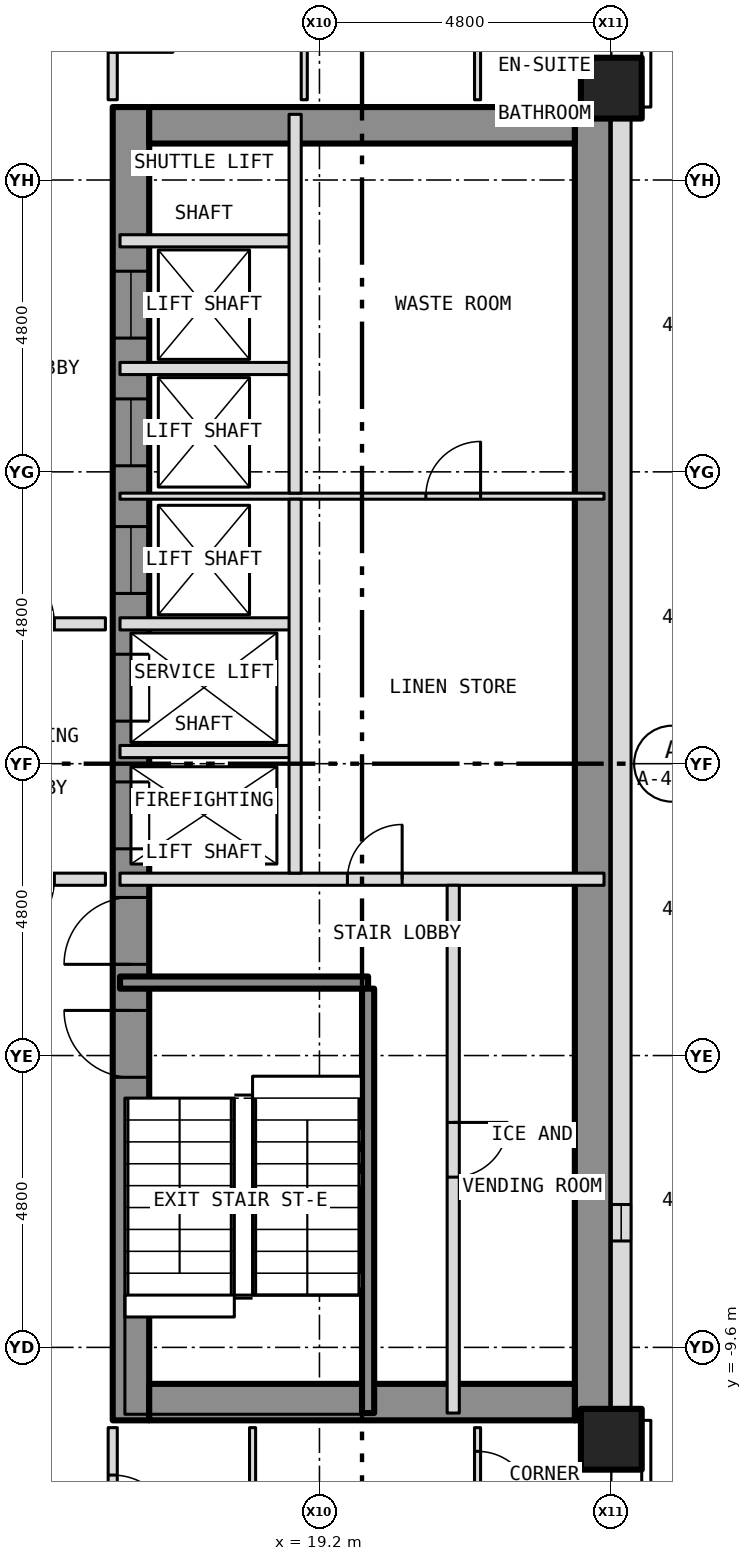
"""IFC4 building model, lengths in metres.
Left out: names, types, materials, properties, quantities, classifications, styles, units other than length and angle.
Written with IfcOpenShell. Run it as: python <this file> out.ifc"""

import sys

from ifc_helpers import new_model, si_unit, direction, frame, frame_2d, origin, origin_2d, place, context, subcontext, project, spatial, rectangle, hollow_rectangle, extrude, element, fill, save


model = new_model("IFC4")
c1 = context("Model", 3, precision=1e-05, world=origin(), true_north=direction((0.0, 1.0)))
c2 = subcontext(c1, "Body", "Model", "MODEL_VIEW")
j1 = project(units=[si_unit("LENGTHUNIT", "METRE"), si_unit("PLANEANGLEUNIT", "RADIAN")], contexts=[c1])
p1 = place(None, origin())
s1 = spatial("IfcSite", under=j1, at=p1, CompositionType="ELEMENT")
p2 = place(p1, origin())
s2 = spatial("IfcBuilding", under=s1, at=p2, CompositionType="ELEMENT")
p3 = place(p2, frame((0.0, 0.0, 56.5)))
s3 = spatial("IfcBuildingStorey", under=s2, at=p3, CompositionType="ELEMENT", Elevation=56.5)
for number, where, z_axis, x_axis in (
    (1, (24.0, -11.111, -0.15), (0.0, 0.0, 1.0), (1.0, 0.0, 0.0)),
    (2, (24.0, 11.111, -0.15), (0.0, 0.0, 1.0), (1.0, 0.0, 0.0)),
):
    element("IfcColumn", number, at=place(p3, frame(where, z_axis=z_axis, x_axis=x_axis)), inside=s3, PredefinedType="COLUMN", context=c2, shape_type="SweptSolid", body=[
        extrude(hollow_rectangle(XDim=1.0, YDim=1.0, WallThickness=0.06, at=origin_2d()), origin(), (0.0, 0.0, 1.0), 3.5),
    ])
p4 = place(p3, frame((16.1, -10.8, 0.0), z_axis=(0.0, 0.0, 1.0), x_axis=(0.0, 1.0, 0.0)))
e3 = element("IfcWall", 3, at=p4, inside=s3, PredefinedType="SHEAR", context=c2, shape_type="SweptSolid", body=[
    extrude(rectangle(XDim=21.6, YDim=0.6, at=frame_2d((10.8, 0.0))), origin(), (0.0, 0.0, 1.0), 3.25),
])
p5 = place(p4, frame((9.4, 0.0, 0.0)))
e4 = element("IfcOpeningElement", 4, at=p5, cuts=e3, PredefinedType="OPENING", context=c2, shape_type="SweptSolid", body=[
    extrude(rectangle(XDim=1.1, YDim=2.1, at=frame_2d((0.55, 1.05))), frame((0.0, 0.312, 0.0), z_axis=(0.0, -1.0, 0.0), x_axis=(1.0, 0.0, 0.0)), (0.0, 0.0, 1.0), 0.624),
])
p6 = place(p4, frame((11.5, 0.0, 0.0)))
e5 = element("IfcOpeningElement", 5, at=p6, cuts=e3, PredefinedType="OPENING", context=c2, shape_type="SweptSolid", body=[
    extrude(rectangle(XDim=1.1, YDim=2.1, at=frame_2d((0.55, 1.05))), frame((0.0, 0.312, 0.0), z_axis=(0.0, -1.0, 0.0), x_axis=(1.0, 0.0, 0.0)), (0.0, 0.0, 1.0), 0.624),
])
p7 = place(p4, frame((13.6, 0.0, 0.0)))
e6 = element("IfcOpeningElement", 6, at=p7, cuts=e3, PredefinedType="OPENING", context=c2, shape_type="SweptSolid", body=[
    extrude(rectangle(XDim=1.1, YDim=2.1, at=frame_2d((0.55, 1.05))), frame((0.0, 0.312, 0.0), z_axis=(0.0, -1.0, 0.0), x_axis=(1.0, 0.0, 0.0)), (0.0, 0.0, 1.0), 0.624),
])
p8 = place(p4, frame((15.7, 0.0, 0.0)))
e7 = element("IfcOpeningElement", 7, at=p8, cuts=e3, PredefinedType="OPENING", context=c2, shape_type="SweptSolid", body=[
    extrude(rectangle(XDim=1.1, YDim=2.1, at=frame_2d((0.55, 1.05))), frame((0.0, 0.312, 0.0), z_axis=(0.0, -1.0, 0.0), x_axis=(1.0, 0.0, 0.0)), (0.0, 0.0, 1.0), 0.624),
])
p9 = place(p4, frame((17.8, 0.0, 0.0)))
e8 = element("IfcOpeningElement", 8, at=p9, cuts=e3, PredefinedType="OPENING", context=c2, shape_type="SweptSolid", body=[
    extrude(rectangle(XDim=1.1, YDim=2.1, at=frame_2d((0.55, 1.05))), frame((0.0, 0.312, 0.0), z_axis=(0.0, -1.0, 0.0), x_axis=(1.0, 0.0, 0.0)), (0.0, 0.0, 1.0), 0.624),
])
p10 = place(p4, frame((5.642, 0.0, 0.0)))
e9 = element("IfcOpeningElement", 9, at=p10, cuts=e3, PredefinedType="OPENING", context=c2, shape_type="SweptSolid", body=[
    extrude(rectangle(XDim=1.1, YDim=2.1, at=frame_2d((0.55, 1.05))), frame((0.0, 0.312, 0.0), z_axis=(0.0, -1.0, 0.0), x_axis=(1.0, 0.0, 0.0)), (0.0, 0.0, 1.0), 0.624),
])
p11 = place(p4, frame((7.5, 0.0, 0.0)))
e10 = element("IfcOpeningElement", 10, at=p11, cuts=e3, PredefinedType="OPENING", context=c2, shape_type="SweptSolid", body=[
    extrude(rectangle(XDim=1.1, YDim=2.1, at=frame_2d((0.55, 1.05))), frame((0.0, 0.312, 0.0), z_axis=(0.0, -1.0, 0.0), x_axis=(1.0, 0.0, 0.0)), (0.0, 0.0, 1.0), 0.624),
])
p12 = place(p3, frame((23.7, -10.8, 0.0), z_axis=(0.0, 0.0, 1.0), x_axis=(0.0, 1.0, 0.0)))
e11 = element("IfcWall", 11, at=p12, inside=s3, PredefinedType="SHEAR", context=c2, shape_type="SweptSolid", body=[
    extrude(rectangle(XDim=21.6, YDim=0.6, at=frame_2d((10.8, 0.0))), origin(), (0.0, 0.0, 1.0), 3.25),
])
for number, where, z_axis, x_axis in (
    (12, (16.4, 10.5, 0.0), (0.0, 0.0, 1.0), (1.0, 0.0, 0.0)),
    (13, (16.4, -10.5, 0.0), (0.0, 0.0, 1.0), (1.0, 0.0, 0.0)),
):
    element("IfcWall", number, at=place(p3, frame(where, z_axis=z_axis, x_axis=x_axis)), inside=s3, PredefinedType="SHEAR", context=c2, shape_type="SweptSolid", body=[
        extrude(rectangle(XDim=7.0, YDim=0.6, at=frame_2d((3.5, 0.0))), origin(), (0.0, 0.0, 1.0), 3.25),
    ])
p13 = place(p3, frame((24.163, -10.8, 0.0), z_axis=(0.0, 0.0, 1.0), x_axis=(0.0, 1.0, 0.0)))
e14 = element("IfcWall", 14, at=p13, inside=s3, PredefinedType="SOLIDWALL", context=c2, shape_type="SweptSolid", body=[
    extrude(rectangle(XDim=21.6, YDim=0.325, at=frame_2d((10.8, 0.0))), origin(), (0.0, 0.0, 1.0), 3.5),
])
p14 = place(p13, frame((2.95, 0.0, 1.0)))
e15 = element("IfcOpeningElement", 15, at=p14, cuts=e14, PredefinedType="OPENING", context=c2, shape_type="SweptSolid", body=[
    extrude(rectangle(XDim=0.6, YDim=1.5, at=frame_2d((0.3, 0.75))), frame((0.0, 0.175, 0.0), z_axis=(0.0, -1.0, 0.0), x_axis=(1.0, 0.0, 0.0)), (0.0, 0.0, 1.0), 0.349),
])
p15 = place(p3, frame((15.92, -3.6, 0.0), z_axis=(0.0, 0.0, 1.0), x_axis=(1.0, 0.0, 0.0)))
e16 = element("IfcWall", 16, at=p15, inside=s3, PredefinedType="SHEAR", context=c2, shape_type="SweptSolid", body=[
    extrude(rectangle(XDim=4.08, YDim=0.2, at=frame_2d((2.04, 0.0))), origin(), (0.0, 0.0, 1.0), 3.25),
])
p16 = place(p3, frame((12.4, -1.9, 0.0), z_axis=(0.0, 0.0, 1.0), x_axis=(1.0, 0.0, 0.0)))
e17 = element("IfcWall", 17, at=p16, inside=s3, PredefinedType="PARTITIONING", context=c2, shape_type="SweptSolid", body=[
    extrude(rectangle(XDim=3.28, YDim=0.2, at=frame_2d((1.64, 0.0))), origin(), (0.0, 0.0, 1.0), 3.35),
])
p17 = place(p16, frame((1.34, 0.0, 0.0)))
e18 = element("IfcOpeningElement", 18, at=p17, cuts=e17, PredefinedType="OPENING", context=c2, shape_type="SweptSolid", body=[
    extrude(rectangle(XDim=1.1, YDim=2.1, at=frame_2d((0.55, 1.05))), frame((0.0, 0.112, 0.0), z_axis=(0.0, -1.0, 0.0), x_axis=(1.0, 0.0, 0.0)), (0.0, 0.0, 1.0), 0.224),
])
p18 = place(p3, frame((15.92, -1.9, 0.0), z_axis=(0.0, 0.0, 1.0), x_axis=(1.0, 0.0, 0.0)))
e19 = element("IfcWall", 19, at=p18, inside=s3, PredefinedType="PARTITIONING", context=c2, shape_type="SweptSolid", body=[
    extrude(rectangle(XDim=7.96, YDim=0.2, at=frame_2d((3.98, 0.0))), origin(), (0.0, 0.0, 1.0), 3.25),
])
p19 = place(p18, frame((3.74, 0.0, 0.0)))
e20 = element("IfcOpeningElement", 20, at=p19, cuts=e19, PredefinedType="OPENING", context=c2, shape_type="SweptSolid", body=[
    extrude(rectangle(XDim=0.9, YDim=2.1, at=frame_2d((0.45, 1.05))), frame((0.0, 0.112, 0.0), z_axis=(0.0, -1.0, 0.0), x_axis=(1.0, 0.0, 0.0)), (0.0, 0.0, 1.0), 0.224),
])
p20 = place(p3, frame((15.92, 0.2, 0.0), z_axis=(0.0, 0.0, 1.0), x_axis=(1.0, 0.0, 0.0)))
e21 = element("IfcWall", 21, at=p20, inside=s3, PredefinedType="PARTITIONING", context=c2, shape_type="SweptSolid", body=[
    extrude(rectangle(XDim=2.88, YDim=0.2, at=frame_2d((1.44, 0.0))), origin(), (0.0, 0.0, 1.0), 3.25),
])
p21 = place(p3, frame((12.4, 2.3, 0.0), z_axis=(0.0, 0.0, 1.0), x_axis=(1.0, 0.0, 0.0)))
e22 = element("IfcWall", 22, at=p21, inside=s3, PredefinedType="PARTITIONING", context=c2, shape_type="SweptSolid", body=[
    extrude(rectangle(XDim=3.28, YDim=0.2, at=frame_2d((1.64, 0.0))), origin(), (0.0, 0.0, 1.0), 3.35),
])
p22 = place(p21, frame((1.34, 0.0, 0.0)))
e23 = element("IfcOpeningElement", 23, at=p22, cuts=e22, PredefinedType="OPENING", context=c2, shape_type="SweptSolid", body=[
    extrude(rectangle(XDim=1.1, YDim=2.1, at=frame_2d((0.55, 1.05))), frame((0.0, 0.112, 0.0), z_axis=(0.0, -1.0, 0.0), x_axis=(1.0, 0.0, 0.0)), (0.0, 0.0, 1.0), 0.224),
])
p23 = place(p3, frame((15.92, 2.3, 0.0), z_axis=(0.0, 0.0, 1.0), x_axis=(1.0, 0.0, 0.0)))
e24 = element("IfcWall", 24, at=p23, inside=s3, PredefinedType="PARTITIONING", context=c2, shape_type="SweptSolid", body=[
    extrude(rectangle(XDim=2.88, YDim=0.2, at=frame_2d((1.44, 0.0))), origin(), (0.0, 0.0, 1.0), 3.25),
])
p24 = place(p3, frame((15.92, 4.4, 0.0), z_axis=(0.0, 0.0, 1.0), x_axis=(1.0, 0.0, 0.0)))
e25 = element("IfcWall", 25, at=p24, inside=s3, PredefinedType="PARTITIONING", context=c2, shape_type="SweptSolid", body=[
    extrude(rectangle(XDim=7.96, YDim=0.1, at=frame_2d((3.98, 0.0))), origin(), (0.0, 0.0, 1.0), 3.25),
])
p25 = place(p24, frame((5.03, 0.0, 0.0)))
e26 = element("IfcOpeningElement", 26, at=p25, cuts=e25, PredefinedType="OPENING", context=c2, shape_type="SweptSolid", body=[
    extrude(rectangle(XDim=0.9, YDim=2.1, at=frame_2d((0.45, 1.05))), frame((0.0, 0.062, 0.0), z_axis=(0.0, -1.0, 0.0), x_axis=(1.0, 0.0, 0.0)), (0.0, 0.0, 1.0), 0.124),
])
for number, where, z_axis, x_axis in (
    (27, (15.92, 6.5, 0.0), (0.0, 0.0, 1.0), (1.0, 0.0, 0.0)),
    (28, (15.92, 8.6, 0.0), (0.0, 0.0, 1.0), (1.0, 0.0, 0.0)),
):
    element("IfcWall", number, at=place(p3, frame(where, z_axis=z_axis, x_axis=x_axis)), inside=s3, PredefinedType="PARTITIONING", context=c2, shape_type="SweptSolid", body=[
        extrude(rectangle(XDim=2.88, YDim=0.2, at=frame_2d((1.44, 0.0))), origin(), (0.0, 0.0, 1.0), 3.25),
    ])
p26 = place(p3, frame((15.8, -15.725, 0.0), z_axis=(0.0, 0.0, 1.0), x_axis=(0.0, 1.0, 0.0)))
e29 = element("IfcWall", 29, at=p26, inside=s3, PredefinedType="PARTITIONING", context=c2, shape_type="SweptSolid", body=[
    extrude(rectangle(XDim=4.805, YDim=0.15, at=frame_2d((2.403, 0.0))), origin(), (0.0, 0.0, 1.0), 3.35),
])
p27 = place(p26, frame((3.025, 0.0, 0.0)))
e30 = element("IfcOpeningElement", 30, at=p27, cuts=e29, PredefinedType="OPENING", context=c2, shape_type="SweptSolid", body=[
    extrude(rectangle(XDim=1.0, YDim=2.1, at=frame_2d((0.5, 1.05))), frame((0.0, 0.087, 0.0), z_axis=(0.0, -1.0, 0.0), x_axis=(1.0, 0.0, 0.0)), (0.0, 0.0, 1.0), 0.174),
])
p28 = place(p3, frame((15.8, 10.92, 0.0), z_axis=(0.0, 0.0, 1.0), x_axis=(0.0, 1.0, 0.0)))
e31 = element("IfcWall", 31, at=p28, inside=s3, PredefinedType="PARTITIONING", context=c2, shape_type="SweptSolid", body=[
    extrude(rectangle(XDim=4.805, YDim=0.15, at=frame_2d((2.403, 0.0))), origin(), (0.0, 0.0, 1.0), 3.35),
])
p29 = place(p28, frame((0.78, 0.0, 0.0)))
e32 = element("IfcOpeningElement", 32, at=p29, cuts=e31, PredefinedType="OPENING", context=c2, shape_type="SweptSolid", body=[
    extrude(rectangle(XDim=1.0, YDim=2.1, at=frame_2d((0.5, 1.05))), frame((0.0, 0.087, 0.0), z_axis=(0.0, -1.0, 0.0), x_axis=(1.0, 0.0, 0.0)), (0.0, 0.0, 1.0), 0.174),
])
p30 = place(p3, frame((18.1, -24.53, 0.0), z_axis=(0.0, 0.0, 1.0), x_axis=(0.0, 1.0, 0.0)))
e33 = element("IfcWall", 33, at=p30, inside=s3, PredefinedType="PARTITIONING", context=c2, shape_type="SweptSolid", body=[
    extrude(rectangle(XDim=13.61, YDim=0.1, at=frame_2d((6.805, 0.0))), origin(), (0.0, 0.0, 1.0), 3.35),
])
p31 = place(p30, frame((6.68, 0.0, 0.0)))
e34 = element("IfcOpeningElement", 34, at=p31, cuts=e33, PredefinedType="OPENING", context=c2, shape_type="SweptSolid", body=[
    extrude(rectangle(XDim=0.9, YDim=2.1, at=frame_2d((0.45, 1.05))), frame((0.0, 0.062, 0.0), z_axis=(0.0, -1.0, 0.0), x_axis=(1.0, 0.0, 0.0)), (0.0, 0.0, 1.0), 0.124),
])
p32 = place(p3, frame((18.8, -1.8, 0.0), z_axis=(0.0, 0.0, 1.0), x_axis=(0.0, 1.0, 0.0)))
e35 = element("IfcWall", 35, at=p32, inside=s3, PredefinedType="PARTITIONING", context=c2, shape_type="SweptSolid", body=[
    extrude(rectangle(XDim=6.15, YDim=0.2, at=frame_2d((3.075, 0.0))), origin(), (0.0, 0.0, 1.0), 3.25),
])
p33 = place(p3, frame((18.8, 4.45, 0.0), z_axis=(0.0, 0.0, 1.0), x_axis=(0.0, 1.0, 0.0)))
e36 = element("IfcWall", 36, at=p33, inside=s3, PredefinedType="PARTITIONING", context=c2, shape_type="SweptSolid", body=[
    extrude(rectangle(XDim=6.23, YDim=0.2, at=frame_2d((3.115, 0.0))), origin(), (0.0, 0.0, 1.0), 3.25),
])
p34 = place(p3, frame((18.95, 10.92, 0.0), z_axis=(0.0, 0.0, 1.0), x_axis=(0.0, 1.0, 0.0)))
e37 = element("IfcWall", 37, at=p34, inside=s3, PredefinedType="PARTITIONING", context=c2, shape_type="SweptSolid", body=[
    extrude(rectangle(XDim=13.61, YDim=0.1, at=frame_2d((6.805, 0.0))), origin(), (0.0, 0.0, 1.0), 3.35),
])
p35 = place(p34, frame((6.03, 0.0, 0.0)))
e38 = element("IfcOpeningElement", 38, at=p35, cuts=e37, PredefinedType="OPENING", context=c2, shape_type="SweptSolid", body=[
    extrude(rectangle(XDim=0.9, YDim=2.1, at=frame_2d((0.45, 1.05))), frame((0.0, 0.062, 0.0), z_axis=(0.0, -1.0, 0.0), x_axis=(1.0, 0.0, 0.0)), (0.0, 0.0, 1.0), 0.124),
])
p36 = place(p3, frame((20.0, -10.68, 0.0), z_axis=(0.0, 0.0, 1.0), x_axis=(0.0, 1.0, 0.0)))
e39 = element("IfcWall", 39, at=p36, inside=s3, PredefinedType="SHEAR", context=c2, shape_type="SweptSolid", body=[
    extrude(rectangle(XDim=6.98, YDim=0.2, at=frame_2d((3.49, 0.0))), origin(), (0.0, 0.0, 1.0), 3.25),
])
p37 = place(p3, frame((21.4, -10.68, 0.0), z_axis=(0.0, 0.0, 1.0), x_axis=(0.0, 1.0, 0.0)))
e40 = element("IfcWall", 40, at=p37, inside=s3, PredefinedType="PARTITIONING", context=c2, shape_type="SweptSolid", body=[
    extrude(rectangle(XDim=8.68, YDim=0.2, at=frame_2d((4.34, 0.0))), origin(), (0.0, 0.0, 1.0), 3.25),
])
p38 = place(p37, frame((3.88, 0.0, 0.0)))
e41 = element("IfcOpeningElement", 41, at=p38, cuts=e40, PredefinedType="OPENING", context=c2, shape_type="SweptSolid", body=[
    extrude(rectangle(XDim=0.9, YDim=2.1, at=frame_2d((0.45, 1.05))), frame((0.0, 0.112, 0.0), z_axis=(0.0, -1.0, 0.0), x_axis=(1.0, 0.0, 0.0)), (0.0, 0.0, 1.0), 0.224),
])
p39 = place(p3, frame((21.8, -13.95, 0.0), z_axis=(0.0, 0.0, 1.0), x_axis=(0.0, 1.0, 0.0)))
e42 = element("IfcWall", 42, at=p39, inside=s3, PredefinedType="PARTITIONING", context=c2, shape_type="SweptSolid", body=[
    extrude(rectangle(XDim=3.03, YDim=0.1, at=frame_2d((1.515, 0.0))), origin(), (0.0, 0.0, 1.0), 3.35),
])
p40 = place(p39, frame((1.74, 0.0, 0.0)))
e43 = element("IfcOpeningElement", 43, at=p40, cuts=e42, PredefinedType="OPENING", context=c2, shape_type="SweptSolid", body=[
    extrude(rectangle(XDim=0.9, YDim=2.1, at=frame_2d((0.45, 1.05))), frame((0.0, 0.062, 0.0), z_axis=(0.0, -1.0, 0.0), x_axis=(1.0, 0.0, 0.0)), (0.0, 0.0, 1.0), 0.124),
])
p41 = place(p3, frame((21.8, 10.92, 0.0), z_axis=(0.0, 0.0, 1.0), x_axis=(0.0, 1.0, 0.0)))
e44 = element("IfcWall", 44, at=p41, inside=s3, PredefinedType="PARTITIONING", context=c2, shape_type="SweptSolid", body=[
    extrude(rectangle(XDim=3.03, YDim=0.1, at=frame_2d((1.515, 0.0))), origin(), (0.0, 0.0, 1.0), 3.35),
])
p42 = place(p41, frame((1.67, 0.0, 0.0)))
e45 = element("IfcOpeningElement", 45, at=p42, cuts=e44, PredefinedType="OPENING", context=c2, shape_type="SweptSolid", body=[
    extrude(rectangle(XDim=0.9, YDim=2.1, at=frame_2d((0.45, 1.05))), frame((0.0, 0.062, 0.0), z_axis=(0.0, -1.0, 0.0), x_axis=(1.0, 0.0, 0.0)), (0.0, 0.0, 1.0), 0.124),
])
p43 = place(p14, origin())
e46 = element("IfcWindow", 46, at=p43, inside=s3, PartitioningType="SINGLE_PANEL", PredefinedType="WINDOW", context=c2, shape_type="SweptSolid", body=[
    extrude(rectangle(XDim=0.6, YDim=1.5, at=frame_2d((0.3, 0.75))), frame((0.0, -0.073, 0.0), z_axis=(0.0, -1.0, 0.0), x_axis=(1.0, 0.0, 0.0)), (0.0, 0.0, 1.0), 0.06),
])
fill(e15, e46)
p44 = place(p5, origin())
e47 = element("IfcDoor", 47, at=p44, inside=s3, OperationType="SLIDING_TO_LEFT", PredefinedType="DOOR", context=c2, shape_type="SweptSolid", body=[
    extrude(rectangle(XDim=1.1, YDim=2.1, at=frame_2d((0.55, 1.05))), frame((0.0, 0.025, 0.0), z_axis=(0.0, -1.0, 0.0), x_axis=(1.0, 0.0, 0.0)), (0.0, 0.0, 1.0), 0.05),
])
fill(e4, e47)
p45 = place(p6, origin())
e48 = element("IfcDoor", 48, at=p45, inside=s3, OperationType="SLIDING_TO_LEFT", PredefinedType="DOOR", context=c2, shape_type="SweptSolid", body=[
    extrude(rectangle(XDim=1.1, YDim=2.1, at=frame_2d((0.55, 1.05))), frame((0.0, 0.025, 0.0), z_axis=(0.0, -1.0, 0.0), x_axis=(1.0, 0.0, 0.0)), (0.0, 0.0, 1.0), 0.05),
])
fill(e5, e48)
p46 = place(p7, origin())
e49 = element("IfcDoor", 49, at=p46, inside=s3, OperationType="SLIDING_TO_LEFT", PredefinedType="DOOR", context=c2, shape_type="SweptSolid", body=[
    extrude(rectangle(XDim=1.1, YDim=2.1, at=frame_2d((0.55, 1.05))), frame((0.0, 0.025, 0.0), z_axis=(0.0, -1.0, 0.0), x_axis=(1.0, 0.0, 0.0)), (0.0, 0.0, 1.0), 0.05),
])
fill(e6, e49)
p47 = place(p8, origin())
e50 = element("IfcDoor", 50, at=p47, inside=s3, OperationType="SLIDING_TO_LEFT", PredefinedType="DOOR", context=c2, shape_type="SweptSolid", body=[
    extrude(rectangle(XDim=1.1, YDim=2.1, at=frame_2d((0.55, 1.05))), frame((0.0, 0.025, 0.0), z_axis=(0.0, -1.0, 0.0), x_axis=(1.0, 0.0, 0.0)), (0.0, 0.0, 1.0), 0.05),
])
fill(e7, e50)
p48 = place(p9, origin())
e51 = element("IfcDoor", 51, at=p48, inside=s3, OperationType="SLIDING_TO_LEFT", PredefinedType="DOOR", context=c2, shape_type="SweptSolid", body=[
    extrude(rectangle(XDim=1.1, YDim=2.1, at=frame_2d((0.55, 1.05))), frame((0.0, 0.025, 0.0), z_axis=(0.0, -1.0, 0.0), x_axis=(1.0, 0.0, 0.0)), (0.0, 0.0, 1.0), 0.05),
])
fill(e8, e51)
p49 = place(p10, origin())
e52 = element("IfcDoor", 52, at=p49, inside=s3, OperationType="SINGLE_SWING_RIGHT", PredefinedType="DOOR", context=c2, shape_type="SweptSolid", body=[
    extrude(rectangle(XDim=1.1, YDim=2.1, at=frame_2d((0.55, 1.05))), frame((0.0, 0.025, 0.0), z_axis=(0.0, -1.0, 0.0), x_axis=(1.0, 0.0, 0.0)), (0.0, 0.0, 1.0), 0.05),
])
fill(e9, e52)
p50 = place(p11, origin())
e53 = element("IfcDoor", 53, at=p50, inside=s3, OperationType="SINGLE_SWING_LEFT", PredefinedType="DOOR", context=c2, shape_type="SweptSolid", body=[
    extrude(rectangle(XDim=1.1, YDim=2.1, at=frame_2d((0.55, 1.05))), frame((0.0, 0.025, 0.0), z_axis=(0.0, -1.0, 0.0), x_axis=(1.0, 0.0, 0.0)), (0.0, 0.0, 1.0), 0.05),
])
fill(e10, e53)
p51 = place(p38, origin())
e54 = element("IfcDoor", 54, at=p51, inside=s3, OperationType="SINGLE_SWING_RIGHT", PredefinedType="DOOR", context=c2, shape_type="SweptSolid", body=[
    extrude(rectangle(XDim=0.9, YDim=2.1, at=frame_2d((0.45, 1.05))), frame((0.0, 0.025, 0.0), z_axis=(0.0, -1.0, 0.0), x_axis=(1.0, 0.0, 0.0)), (0.0, 0.0, 1.0), 0.05),
])
fill(e41, e54)
p52 = place(p19, origin())
e55 = element("IfcDoor", 55, at=p52, inside=s3, OperationType="SINGLE_SWING_RIGHT", PredefinedType="DOOR", context=c2, shape_type="SweptSolid", body=[
    extrude(rectangle(XDim=0.9, YDim=2.1, at=frame_2d((0.45, 1.05))), frame((0.0, 0.025, 0.0), z_axis=(0.0, -1.0, 0.0), x_axis=(1.0, 0.0, 0.0)), (0.0, 0.0, 1.0), 0.05),
])
fill(e20, e55)
p53 = place(p25, origin())
e56 = element("IfcDoor", 56, at=p53, inside=s3, OperationType="SINGLE_SWING_RIGHT", PredefinedType="DOOR", context=c2, shape_type="SweptSolid", body=[
    extrude(rectangle(XDim=0.9, YDim=2.1, at=frame_2d((0.45, 1.05))), frame((0.0, 0.025, 0.0), z_axis=(0.0, -1.0, 0.0), x_axis=(1.0, 0.0, 0.0)), (0.0, 0.0, 1.0), 0.05),
])
fill(e26, e56)
p54 = place(p22, origin())
e57 = element("IfcDoor", 57, at=p54, inside=s3, OperationType="SINGLE_SWING_LEFT", PredefinedType="DOOR", context=c2, shape_type="SweptSolid", body=[
    extrude(rectangle(XDim=1.1, YDim=2.1, at=frame_2d((0.55, 1.05))), frame((0.0, 0.025, 0.0), z_axis=(0.0, -1.0, 0.0), x_axis=(1.0, 0.0, 0.0)), (0.0, 0.0, 1.0), 0.05),
])
fill(e23, e57)
p55 = place(p17, origin())
e58 = element("IfcDoor", 58, at=p55, inside=s3, OperationType="SINGLE_SWING_LEFT", PredefinedType="DOOR", context=c2, shape_type="SweptSolid", body=[
    extrude(rectangle(XDim=1.1, YDim=2.1, at=frame_2d((0.55, 1.05))), frame((0.0, 0.025, 0.0), z_axis=(0.0, -1.0, 0.0), x_axis=(1.0, 0.0, 0.0)), (0.0, 0.0, 1.0), 0.05),
])
fill(e18, e58)
p56 = place(p27, origin())
e59 = element("IfcDoor", 59, at=p56, inside=s3, OperationType="SINGLE_SWING_LEFT", PredefinedType="DOOR", context=c2, shape_type="SweptSolid", body=[
    extrude(rectangle(XDim=1.0, YDim=2.1, at=frame_2d((0.5, 1.05))), frame((0.0, 0.025, 0.0), z_axis=(0.0, -1.0, 0.0), x_axis=(1.0, 0.0, 0.0)), (0.0, 0.0, 1.0), 0.05),
])
fill(e30, e59)
p57 = place(p40, origin())
e60 = element("IfcDoor", 60, at=p57, inside=s3, OperationType="SINGLE_SWING_LEFT", PredefinedType="DOOR", context=c2, shape_type="SweptSolid", body=[
    extrude(rectangle(XDim=0.9, YDim=2.1, at=frame_2d((0.45, 1.05))), frame((0.0, 0.025, 0.0), z_axis=(0.0, -1.0, 0.0), x_axis=(1.0, 0.0, 0.0)), (0.0, 0.0, 1.0), 0.05),
])
fill(e43, e60)
save(model, sys.argv[1])
